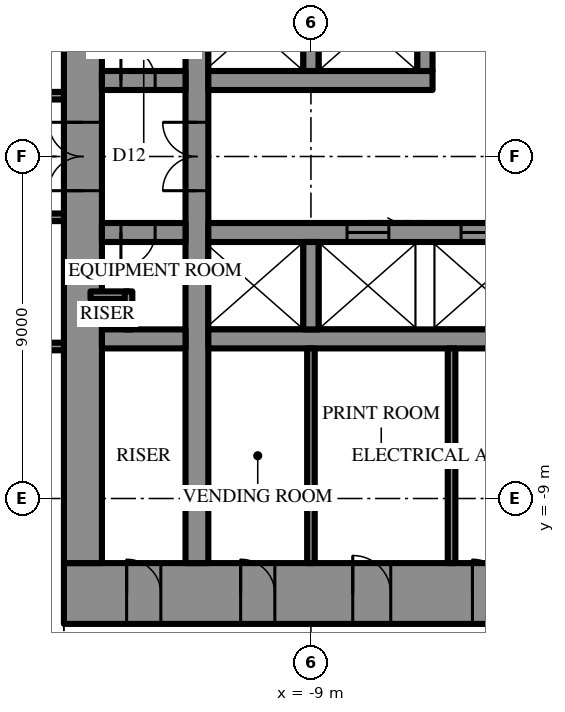
"""IFC4 building model, lengths in metres.
Left out: names, types, materials, properties, quantities, classifications, styles, units other than length and angle.
Written with IfcOpenShell. Run it as: python <this file> out.ifc"""

import sys

from ifc_helpers import new_model, si_unit, direction, frame, frame_2d, origin, place, context, subcontext, project, spatial, rectangle, extrude, element, fill, save


model = new_model("IFC4")
c1 = context("Model", 3, precision=1e-05, world=origin(), true_north=direction((0.0, 1.0)))
c2 = subcontext(c1, "Body", "Model", "MODEL_VIEW")
j1 = project(units=[si_unit("LENGTHUNIT", "METRE"), si_unit("PLANEANGLEUNIT", "RADIAN")], contexts=[c1])
p1 = place(None, origin())
s1 = spatial("IfcSite", under=j1, at=p1, CompositionType="ELEMENT")
p2 = place(p1, origin())
s2 = spatial("IfcBuilding", under=s1, at=p2, CompositionType="ELEMENT")
p3 = place(p2, frame((0.0, 0.0, 257.5)))
s3 = spatial("IfcBuildingStorey", under=s2, at=p3, CompositionType="ELEMENT", Elevation=257.5)
p4 = place(p3, frame((15.5, -11.5, 0.0), z_axis=(0.0, 0.0, 1.0), x_axis=(-1.0, 0.0, 0.0)))
e1 = element("IfcWall", 1, at=p4, inside=s3, PredefinedType="SHEAR", context=c2, shape_type="SweptSolid", body=[
    extrude(rectangle(XDim=31.0, YDim=1.6, at=frame_2d((15.5, 0.0))), origin(), (0.0, 0.0, 1.0), 4.2),
])
p5 = place(p4, frame((16.35, 0.0, 0.0)))
e2 = element("IfcOpeningElement", 2, at=p5, cuts=e1, PredefinedType="OPENING", context=c2, shape_type="SweptSolid", body=[
    extrude(rectangle(XDim=0.9, YDim=2.2, at=frame_2d((0.45, 1.1))), frame((0.0, 0.81, 0.0), z_axis=(0.0, -1.0, 0.0), x_axis=(1.0, 0.0, 0.0)), (0.0, 0.0, 1.0), 1.62),
])
p6 = place(p4, frame((19.35, 0.0, 0.0)))
e3 = element("IfcOpeningElement", 3, at=p6, cuts=e1, PredefinedType="OPENING", context=c2, shape_type="SweptSolid", body=[
    extrude(rectangle(XDim=0.9, YDim=2.2, at=frame_2d((0.45, 1.1))), frame((0.0, 0.81, 0.0), z_axis=(0.0, -1.0, 0.0), x_axis=(1.0, 0.0, 0.0)), (0.0, 0.0, 1.0), 1.62),
])
p7 = place(p4, frame((22.4, 0.0, 0.0)))
e4 = element("IfcOpeningElement", 4, at=p7, cuts=e1, PredefinedType="OPENING", context=c2, shape_type="SweptSolid", body=[
    extrude(rectangle(XDim=1.0, YDim=2.2, at=frame_2d((0.5, 1.1))), frame((0.0, 0.81, 0.0), z_axis=(0.0, -1.0, 0.0), x_axis=(1.0, 0.0, 0.0)), (0.0, 0.0, 1.0), 1.62),
])
p8 = place(p4, frame((1.65, 0.0, 0.0)))
e5 = element("IfcOpeningElement", 5, at=p8, cuts=e1, PredefinedType="OPENING", context=c2, shape_type="SweptSolid", body=[
    extrude(rectangle(XDim=0.9, YDim=2.2, at=frame_2d((0.45, 1.1))), frame((0.0, 0.81, 0.0), z_axis=(0.0, -1.0, 0.0), x_axis=(1.0, 0.0, 0.0)), (0.0, 0.0, 1.0), 1.62),
])
p9 = place(p4, frame((4.65, 0.0, 0.0)))
e6 = element("IfcOpeningElement", 6, at=p9, cuts=e1, PredefinedType="OPENING", context=c2, shape_type="SweptSolid", body=[
    extrude(rectangle(XDim=0.9, YDim=2.2, at=frame_2d((0.45, 1.1))), frame((0.0, 0.81, 0.0), z_axis=(0.0, -1.0, 0.0), x_axis=(1.0, 0.0, 0.0)), (0.0, 0.0, 1.0), 1.62),
])
p10 = place(p4, frame((25.45, 0.0, 0.0)))
e7 = element("IfcOpeningElement", 7, at=p10, cuts=e1, PredefinedType="OPENING", context=c2, shape_type="SweptSolid", body=[
    extrude(rectangle(XDim=0.9, YDim=2.2, at=frame_2d((0.45, 1.1))), frame((0.0, 0.81, 0.0), z_axis=(0.0, -1.0, 0.0), x_axis=(1.0, 0.0, 0.0)), (0.0, 0.0, 1.0), 1.62),
])
p11 = place(p4, frame((28.45, 0.0, 0.0)))
e8 = element("IfcOpeningElement", 8, at=p11, cuts=e1, PredefinedType="OPENING", context=c2, shape_type="SweptSolid", body=[
    extrude(rectangle(XDim=0.9, YDim=2.2, at=frame_2d((0.45, 1.1))), frame((0.0, 0.81, 0.0), z_axis=(0.0, -1.0, 0.0), x_axis=(1.0, 0.0, 0.0)), (0.0, 0.0, 1.0), 1.62),
])
p12 = place(p3, frame((-15.0, 10.7, 0.0), z_axis=(0.0, 0.0, 1.0), x_axis=(0.0, -1.0, 0.0)))
e9 = element("IfcWall", 9, at=p12, inside=s3, PredefinedType="SHEAR", context=c2, shape_type="SweptSolid", body=[
    extrude(rectangle(XDim=21.4, YDim=1.0, at=frame_2d((10.7, 0.0))), origin(), (0.0, 0.0, 1.0), 4.2),
])
p13 = place(p12, frame((9.8, 0.0, 0.0)))
e10 = element("IfcOpeningElement", 10, at=p13, cuts=e9, PredefinedType="OPENING", context=c2, shape_type="SweptSolid", body=[
    extrude(rectangle(XDim=1.8, YDim=2.4, at=frame_2d((0.9, 1.2))), frame((0.0, 0.51, 0.0), z_axis=(0.0, -1.0, 0.0), x_axis=(1.0, 0.0, 0.0)), (0.0, 0.0, 1.0), 1.02),
])
p14 = place(p3, frame((-12.0, -10.7, 0.0), z_axis=(0.0, 0.0, 1.0), x_axis=(0.0, 1.0, 0.0)))
e11 = element("IfcWall", 11, at=p14, inside=s3, PredefinedType="SHEAR", context=c2, shape_type="SweptSolid", body=[
    extrude(rectangle(XDim=21.4, YDim=0.6, at=frame_2d((10.7, 0.0))), origin(), (0.0, 0.0, 1.0), 4.2),
])
p15 = place(p14, frame((9.8, 0.0, 0.0)))
e12 = element("IfcOpeningElement", 12, at=p15, cuts=e11, PredefinedType="OPENING", context=c2, shape_type="SweptSolid", body=[
    extrude(rectangle(XDim=1.8, YDim=2.4, at=frame_2d((0.9, 1.2))), frame((0.0, 0.31, 0.0), z_axis=(0.0, -1.0, 0.0), x_axis=(1.0, 0.0, 0.0)), (0.0, 0.0, 1.0), 0.62),
])
p16 = place(p3, frame((-14.5, 2.0, 0.0), z_axis=(0.0, 0.0, 1.0), x_axis=(1.0, 0.0, 0.0)))
e13 = element("IfcWall", 13, at=p16, inside=s3, PredefinedType="SHEAR", context=c2, shape_type="SweptSolid", body=[
    extrude(rectangle(XDim=2.2, YDim=0.5, at=frame_2d((1.1, 0.0))), origin(), (0.0, 0.0, 1.0), 4.2),
])
p17 = place(p16, frame((0.5, 0.0, 0.0)))
e14 = element("IfcOpeningElement", 14, at=p17, cuts=e13, PredefinedType="OPENING", context=c2, shape_type="SweptSolid", body=[
    extrude(rectangle(XDim=0.9, YDim=2.2, at=frame_2d((0.45, 1.1))), frame((0.0, 0.26, 0.0), z_axis=(0.0, -1.0, 0.0), x_axis=(1.0, 0.0, 0.0)), (0.0, 0.0, 1.0), 0.52),
])
p18 = place(p3, frame((-11.7, 2.0, 0.0), z_axis=(0.0, 0.0, 1.0), x_axis=(1.0, 0.0, 0.0)))
e15 = element("IfcWall", 15, at=p18, inside=s3, PredefinedType="SHEAR", context=c2, shape_type="SweptSolid", body=[
    extrude(rectangle(XDim=5.9, YDim=0.5, at=frame_2d((2.95, 0.0))), origin(), (0.0, 0.0, 1.0), 4.2),
])
for number, where, z_axis, x_axis in (
    (16, (-9.0, 2.25, 0.0), (0.0, 0.0, 1.0), (0.0, 1.0, 0.0)),
    (17, (-6.0, 2.25, 0.0), (0.0, 0.0, 1.0), (0.0, 1.0, 0.0)),
):
    element("IfcWall", number, at=place(p3, frame(where, z_axis=z_axis, x_axis=x_axis)), inside=s3, PredefinedType="SHEAR", context=c2, shape_type="SweptSolid", body=[
        extrude(rectangle(XDim=2.3, YDim=0.4, at=frame_2d((1.15, 0.0))), origin(), (0.0, 0.0, 1.0), 4.2),
    ])
p19 = place(p3, frame((3.2, -2.0, 0.0), z_axis=(0.0, 0.0, 1.0), x_axis=(-1.0, 0.0, 0.0)))
e18 = element("IfcWall", 18, at=p19, inside=s3, PredefinedType="SHEAR", context=c2, shape_type="SweptSolid", body=[
    extrude(rectangle(XDim=14.9, YDim=0.5, at=frame_2d((7.45, 0.0))), origin(), (0.0, 0.0, 1.0), 4.2),
])
p20 = place(p19, frame((1.15, 0.0, 0.0)))
e19 = element("IfcOpeningElement", 19, at=p20, cuts=e18, PredefinedType="OPENING", context=c2, shape_type="SweptSolid", body=[
    extrude(rectangle(XDim=1.1, YDim=2.2, at=frame_2d((0.55, 1.1))), frame((0.0, 0.26, 0.0), z_axis=(0.0, -1.0, 0.0), x_axis=(1.0, 0.0, 0.0)), (0.0, 0.0, 1.0), 0.52),
])
p21 = place(p19, frame((4.15, 0.0, 0.0)))
e20 = element("IfcOpeningElement", 20, at=p21, cuts=e18, PredefinedType="OPENING", context=c2, shape_type="SweptSolid", body=[
    extrude(rectangle(XDim=1.1, YDim=2.2, at=frame_2d((0.55, 1.1))), frame((0.0, 0.26, 0.0), z_axis=(0.0, -1.0, 0.0), x_axis=(1.0, 0.0, 0.0)), (0.0, 0.0, 1.0), 0.52),
])
p22 = place(p19, frame((7.15, 0.0, 0.0)))
e21 = element("IfcOpeningElement", 21, at=p22, cuts=e18, PredefinedType="OPENING", context=c2, shape_type="SweptSolid", body=[
    extrude(rectangle(XDim=1.1, YDim=2.2, at=frame_2d((0.55, 1.1))), frame((0.0, 0.26, 0.0), z_axis=(0.0, -1.0, 0.0), x_axis=(1.0, 0.0, 0.0)), (0.0, 0.0, 1.0), 0.52),
])
p23 = place(p19, frame((10.15, 0.0, 0.0)))
e22 = element("IfcOpeningElement", 22, at=p23, cuts=e18, PredefinedType="OPENING", context=c2, shape_type="SweptSolid", body=[
    extrude(rectangle(XDim=1.1, YDim=2.2, at=frame_2d((0.55, 1.1))), frame((0.0, 0.26, 0.0), z_axis=(0.0, -1.0, 0.0), x_axis=(1.0, 0.0, 0.0)), (0.0, 0.0, 1.0), 0.52),
])
p24 = place(p3, frame((-12.3, -2.0, 0.0), z_axis=(0.0, 0.0, 1.0), x_axis=(-1.0, 0.0, 0.0)))
e23 = element("IfcWall", 23, at=p24, inside=s3, PredefinedType="SHEAR", context=c2, shape_type="SweptSolid", body=[
    extrude(rectangle(XDim=2.2, YDim=0.5, at=frame_2d((1.1, 0.0))), origin(), (0.0, 0.0, 1.0), 4.2),
])
p25 = place(p24, frame((0.8, 0.0, 0.0)))
e24 = element("IfcOpeningElement", 24, at=p25, cuts=e23, PredefinedType="OPENING", context=c2, shape_type="SweptSolid", body=[
    extrude(rectangle(XDim=0.9, YDim=2.2, at=frame_2d((0.45, 1.1))), frame((0.0, 0.26, 0.0), z_axis=(0.0, -1.0, 0.0), x_axis=(1.0, 0.0, 0.0)), (0.0, 0.0, 1.0), 0.52),
])
p26 = place(p3, frame((11.7, -4.8, 0.0), z_axis=(0.0, 0.0, 1.0), x_axis=(-1.0, 0.0, 0.0)))
e25 = element("IfcWall", 25, at=p26, inside=s3, PredefinedType="SHEAR", context=c2, shape_type="SweptSolid", body=[
    extrude(rectangle(XDim=23.4, YDim=0.5, at=frame_2d((11.7, 0.0))), origin(), (0.0, 0.0, 1.0), 4.2),
])
p27 = place(p26, frame((6.6, 0.0, 0.0)))
e26 = element("IfcOpeningElement", 26, at=p27, cuts=e25, PredefinedType="OPENING", context=c2, shape_type="SweptSolid", body=[
    extrude(rectangle(XDim=1.2, YDim=2.2, at=frame_2d((0.6, 1.1))), frame((0.0, 0.26, 0.0), z_axis=(0.0, -1.0, 0.0), x_axis=(1.0, 0.0, 0.0)), (0.0, 0.0, 1.0), 0.52),
])
p28 = place(p26, frame((3.6, 0.0, 0.0)))
e27 = element("IfcOpeningElement", 27, at=p28, cuts=e25, PredefinedType="OPENING", context=c2, shape_type="SweptSolid", body=[
    extrude(rectangle(XDim=1.2, YDim=2.2, at=frame_2d((0.6, 1.1))), frame((0.0, 0.26, 0.0), z_axis=(0.0, -1.0, 0.0), x_axis=(1.0, 0.0, 0.0)), (0.0, 0.0, 1.0), 0.52),
])
p29 = place(p3, frame((-12.3, -4.8, 0.0), z_axis=(0.0, 0.0, 1.0), x_axis=(-1.0, 0.0, 0.0)))
e28 = element("IfcWall", 28, at=p29, inside=s3, PredefinedType="SHEAR", context=c2, shape_type="SweptSolid", body=[
    extrude(rectangle(XDim=2.2, YDim=0.5, at=frame_2d((1.1, 0.0))), origin(), (0.0, 0.0, 1.0), 4.2),
])
p30 = place(p3, frame((-9.0, -2.25, 0.0), z_axis=(0.0, 0.0, 1.0), x_axis=(0.0, -1.0, 0.0)))
e29 = element("IfcWall", 29, at=p30, inside=s3, PredefinedType="SHEAR", context=c2, shape_type="SweptSolid", body=[
    extrude(rectangle(XDim=2.3, YDim=0.4, at=frame_2d((1.15, 0.0))), origin(), (0.0, 0.0, 1.0), 4.2),
])
for number, where, z_axis, x_axis in (
    (30, (-9.0, -5.05, 0.0), (0.0, 0.0, 1.0), (0.0, -1.0, 0.0)),
    (31, (-5.3, -5.05, 0.0), (0.0, 0.0, 1.0), (0.0, -1.0, 0.0)),
):
    element("IfcWall", number, at=place(p3, frame(where, z_axis=z_axis, x_axis=x_axis)), inside=s3, PredefinedType="PARTITIONING", context=c2, shape_type="SweptSolid", body=[
        extrude(rectangle(XDim=5.65, YDim=0.2, at=frame_2d((2.825, 0.0))), origin(), (0.0, 0.0, 1.0), 4.0),
    ])
for number, where, z_axis, x_axis in (
    (32, (-13.8, -3.65, 0.0), (0.0, 0.0, 1.0), (-1.0, 0.0, 0.0)),
    (33, (-13.8, -3.55, 0.0), (0.0, 0.0, 1.0), (0.0, -1.0, 0.0)),
):
    element("IfcWall", number, at=place(p3, frame(where, z_axis=z_axis, x_axis=x_axis)), inside=s3, PredefinedType="PARTITIONING", context=c2, shape_type="SweptSolid", body=[
        extrude(rectangle(XDim=1.0, YDim=0.2, at=frame_2d((0.5, 0.0))), origin(), (0.0, 0.0, 1.0), 4.0),
    ])
p31 = place(p3, frame((-15.5, 1.6, 0.0), z_axis=(0.0, 0.0, 1.0), x_axis=(-1.0, 0.0, 0.0)))
e34 = element("IfcWall", 34, at=p31, inside=s3, PredefinedType="PARTITIONING", context=c2, shape_type="SweptSolid", body=[
    extrude(rectangle(XDim=11.7, YDim=0.2, at=frame_2d((5.85, 0.0))), origin(), (0.0, 0.0, 1.0), 4.0),
])
p32 = place(p31, frame((3.01, 0.0, 0.0)))
e35 = element("IfcOpeningElement", 35, at=p32, cuts=e34, PredefinedType="OPENING", context=c2, shape_type="SweptSolid", body=[
    extrude(rectangle(XDim=1.0, YDim=2.2, at=frame_2d((0.5, 1.1))), frame((0.0, 0.11, 0.0), z_axis=(0.0, -1.0, 0.0), x_axis=(1.0, 0.0, 0.0)), (0.0, 0.0, 1.0), 0.22),
])
p33 = place(p3, frame((-15.5, -1.6, 0.0), z_axis=(0.0, 0.0, 1.0), x_axis=(-1.0, 0.0, 0.0)))
e36 = element("IfcWall", 36, at=p33, inside=s3, PredefinedType="PARTITIONING", context=c2, shape_type="SweptSolid", body=[
    extrude(rectangle(XDim=11.7, YDim=0.2, at=frame_2d((5.85, 0.0))), origin(), (0.0, 0.0, 1.0), 4.0),
])
p34 = place(p33, frame((3.01, 0.0, 0.0)))
e37 = element("IfcOpeningElement", 37, at=p34, cuts=e36, PredefinedType="OPENING", context=c2, shape_type="SweptSolid", body=[
    extrude(rectangle(XDim=1.0, YDim=2.2, at=frame_2d((0.5, 1.1))), frame((0.0, 0.11, 0.0), z_axis=(0.0, -1.0, 0.0), x_axis=(1.0, 0.0, 0.0)), (0.0, 0.0, 1.0), 0.22),
])
p35 = place(p3, frame((-15.5, -5.0, 0.0), z_axis=(0.0, 0.0, 1.0), x_axis=(-1.0, 0.0, 0.0)))
e38 = element("IfcWall", 38, at=p35, inside=s3, PredefinedType="PARTITIONING", context=c2, shape_type="SweptSolid", body=[
    extrude(rectangle(XDim=14.845, YDim=0.2, at=frame_2d((7.423, 0.0))), origin(), (0.0, 0.0, 1.0), 4.0),
])
p36 = place(p35, frame((0.985, 0.0, 0.0)))
e39 = element("IfcOpeningElement", 39, at=p36, cuts=e38, PredefinedType="OPENING", context=c2, shape_type="SweptSolid", body=[
    extrude(rectangle(XDim=1.0, YDim=2.2, at=frame_2d((0.5, 1.1))), frame((0.0, 0.11, 0.0), z_axis=(0.0, -1.0, 0.0), x_axis=(1.0, 0.0, 0.0)), (0.0, 0.0, 1.0), 0.22),
])
p37 = place(p13, frame((1.8, 0.0, 0.0), z_axis=(0.0, 0.0, 1.0), x_axis=(-1.0, 0.0, 0.0)))
e40 = element("IfcDoor", 40, at=p37, inside=s3, OperationType="DOUBLE_DOOR_SINGLE_SWING", PredefinedType="DOOR", context=c2, shape_type="SweptSolid", body=[
    extrude(rectangle(XDim=1.8, YDim=2.4, at=frame_2d((0.9, 1.2))), frame((0.0, 0.025, 0.0), z_axis=(0.0, -1.0, 0.0), x_axis=(1.0, 0.0, 0.0)), (0.0, 0.0, 1.0), 0.05),
])
fill(e10, e40)
p38 = place(p6, frame((0.9, 0.0, 0.0), z_axis=(0.0, 0.0, 1.0), x_axis=(-1.0, 0.0, 0.0)))
e41 = element("IfcDoor", 41, at=p38, inside=s3, OperationType="SINGLE_SWING_RIGHT", PredefinedType="DOOR", context=c2, shape_type="SweptSolid", body=[
    extrude(rectangle(XDim=0.9, YDim=2.2, at=frame_2d((0.45, 1.1))), frame((0.0, 0.025, 0.0), z_axis=(0.0, -1.0, 0.0), x_axis=(1.0, 0.0, 0.0)), (0.0, 0.0, 1.0), 0.05),
])
fill(e3, e41)
p39 = place(p7, frame((1.0, 0.0, 0.0), z_axis=(0.0, 0.0, 1.0), x_axis=(-1.0, 0.0, 0.0)))
e42 = element("IfcDoor", 42, at=p39, inside=s3, OperationType="SINGLE_SWING_RIGHT", PredefinedType="DOOR", context=c2, shape_type="SweptSolid", body=[
    extrude(rectangle(XDim=1.0, YDim=2.2, at=frame_2d((0.5, 1.1))), frame((0.0, 0.025, 0.0), z_axis=(0.0, -1.0, 0.0), x_axis=(1.0, 0.0, 0.0)), (0.0, 0.0, 1.0), 0.05),
])
fill(e4, e42)
p40 = place(p10, frame((0.9, 0.0, 0.0), z_axis=(0.0, 0.0, 1.0), x_axis=(-1.0, 0.0, 0.0)))
e43 = element("IfcDoor", 43, at=p40, inside=s3, OperationType="SINGLE_SWING_RIGHT", PredefinedType="DOOR", context=c2, shape_type="SweptSolid", body=[
    extrude(rectangle(XDim=0.9, YDim=2.2, at=frame_2d((0.45, 1.1))), frame((0.0, 0.025, 0.0), z_axis=(0.0, -1.0, 0.0), x_axis=(1.0, 0.0, 0.0)), (0.0, 0.0, 1.0), 0.05),
])
fill(e7, e43)
p41 = place(p11, frame((0.9, 0.0, 0.0), z_axis=(0.0, 0.0, 1.0), x_axis=(-1.0, 0.0, 0.0)))
e44 = element("IfcDoor", 44, at=p41, inside=s3, OperationType="SINGLE_SWING_RIGHT", PredefinedType="DOOR", context=c2, shape_type="SweptSolid", body=[
    extrude(rectangle(XDim=0.9, YDim=2.2, at=frame_2d((0.45, 1.1))), frame((0.0, 0.025, 0.0), z_axis=(0.0, -1.0, 0.0), x_axis=(1.0, 0.0, 0.0)), (0.0, 0.0, 1.0), 0.05),
])
fill(e8, e44)
p42 = place(p17, origin())
e45 = element("IfcDoor", 45, at=p42, inside=s3, OperationType="SINGLE_SWING_RIGHT", PredefinedType="DOOR", context=c2, shape_type="SweptSolid", body=[
    extrude(rectangle(XDim=0.9, YDim=2.2, at=frame_2d((0.45, 1.1))), frame((0.0, 0.025, 0.0), z_axis=(0.0, -1.0, 0.0), x_axis=(1.0, 0.0, 0.0)), (0.0, 0.0, 1.0), 0.05),
])
fill(e14, e45)
p43 = place(p25, origin())
e46 = element("IfcDoor", 46, at=p43, inside=s3, OperationType="SINGLE_SWING_LEFT", PredefinedType="DOOR", context=c2, shape_type="SweptSolid", body=[
    extrude(rectangle(XDim=0.9, YDim=2.2, at=frame_2d((0.45, 1.1))), frame((0.0, 0.025, 0.0), z_axis=(0.0, -1.0, 0.0), x_axis=(1.0, 0.0, 0.0)), (0.0, 0.0, 1.0), 0.05),
])
fill(e24, e46)
p44 = place(p15, origin())
e47 = element("IfcDoor", 47, at=p44, inside=s3, OperationType="DOUBLE_DOOR_SINGLE_SWING", PredefinedType="DOOR", context=c2, shape_type="SweptSolid", body=[
    extrude(rectangle(XDim=1.8, YDim=2.4, at=frame_2d((0.9, 1.2))), frame((0.0, 0.025, 0.0), z_axis=(0.0, -1.0, 0.0), x_axis=(1.0, 0.0, 0.0)), (0.0, 0.0, 1.0), 0.05),
])
fill(e12, e47)
p45 = place(p22, frame((1.1, 0.0, 0.0), z_axis=(0.0, 0.0, 1.0), x_axis=(-1.0, 0.0, 0.0)))
e48 = element("IfcDoor", 48, at=p45, inside=s3, OperationType="SLIDING_TO_LEFT", PredefinedType="DOOR", context=c2, shape_type="SweptSolid", body=[
    extrude(rectangle(XDim=1.1, YDim=2.2, at=frame_2d((0.55, 1.1))), frame((0.0, 0.025, 0.0), z_axis=(0.0, -1.0, 0.0), x_axis=(1.0, 0.0, 0.0)), (0.0, 0.0, 1.0), 0.05),
])
fill(e21, e48)
p46 = place(p23, frame((1.1, 0.0, 0.0), z_axis=(0.0, 0.0, 1.0), x_axis=(-1.0, 0.0, 0.0)))
e49 = element("IfcDoor", 49, at=p46, inside=s3, OperationType="SLIDING_TO_LEFT", PredefinedType="DOOR", context=c2, shape_type="SweptSolid", body=[
    extrude(rectangle(XDim=1.1, YDim=2.2, at=frame_2d((0.55, 1.1))), frame((0.0, 0.025, 0.0), z_axis=(0.0, -1.0, 0.0), x_axis=(1.0, 0.0, 0.0)), (0.0, 0.0, 1.0), 0.05),
])
fill(e22, e49)
save(model, sys.argv[1])
